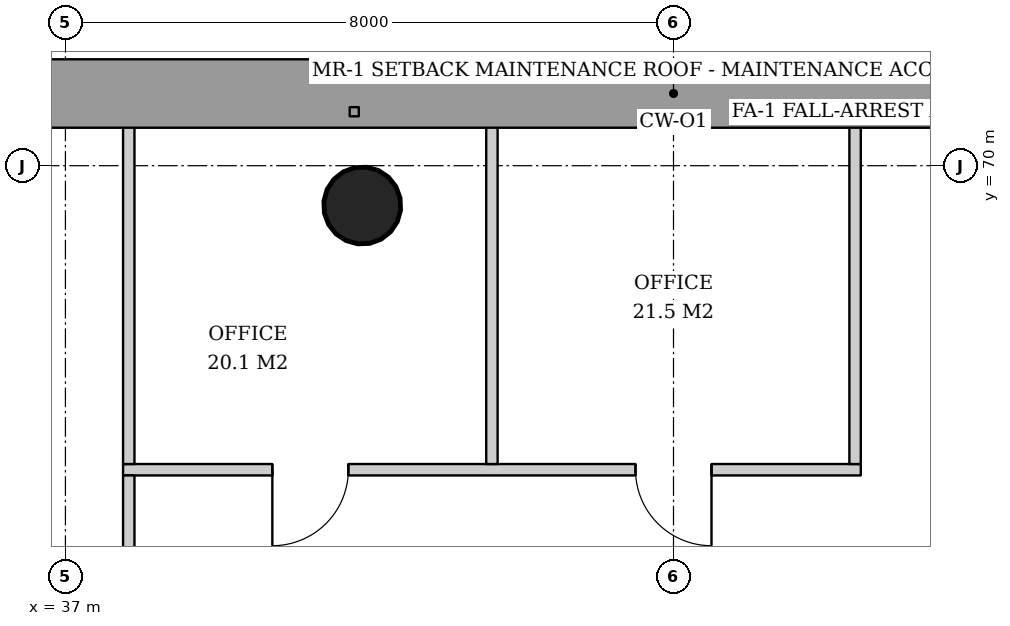
"""IFC4 building model, lengths in metres.
Left out: names, types, materials, properties, quantities, classifications, styles, units other than length and angle.
Written with IfcOpenShell. Run it as: python <this file> out.ifc"""

import sys

from ifc_helpers import new_model, si_unit, direction, frame, frame_2d, origin, origin_2d, place, context, subcontext, project, spatial, rectangle, hollow_circle, extrude, element, fill, save


model = new_model("IFC4")
c1 = context("Model", 3, precision=1e-05, world=origin(), true_north=direction((0.0, 1.0)))
c2 = subcontext(c1, "Body", "Model", "MODEL_VIEW")
j1 = project(units=[si_unit("LENGTHUNIT", "METRE"), si_unit("PLANEANGLEUNIT", "RADIAN")], contexts=[c1])
p1 = place(None, origin())
s1 = spatial("IfcSite", under=j1, at=p1, CompositionType="ELEMENT")
p2 = place(p1, origin())
s2 = spatial("IfcBuilding", under=s1, at=p2, CompositionType="ELEMENT")
p3 = place(p2, frame((0.0, 0.0, 36.2)))
s3 = spatial("IfcBuildingStorey", under=s2, at=p3, CompositionType="ELEMENT", Elevation=36.2)
p4 = place(p3, frame((40.897, 69.514, 0.0), z_axis=(0.00635704258, -0.031977850555, 0.999468361222), x_axis=(0.980807266515, 0.194979757801, 0.0)))
e1 = element("IfcColumn", 1, at=p4, inside=s3, PredefinedType="COLUMN", context=c2, shape_type="SweptSolid", body=[
    extrude(hollow_circle(Radius=0.508, WallThickness=0.04, at=origin_2d()), origin(), (0.0, 0.0, 1.0), 3.802),
])
p5 = place(p3, frame((47.464, 66.0, 0.0), z_axis=(0.0, 0.0, 1.0), x_axis=(-1.0, 0.0, 0.0)))
e2 = element("IfcWall", 2, at=p5, inside=s3, PredefinedType="PARTITIONING", context=c2, shape_type="SweptSolid", body=[
    extrude(rectangle(XDim=9.706, YDim=0.15, at=frame_2d((4.853, 0.0))), origin(), (0.0, 0.0, 1.0), 2.85),
])
p6 = place(p5, frame((1.964, 0.0, 0.0)))
e3 = element("IfcOpeningElement", 3, at=p6, cuts=e2, PredefinedType="OPENING", context=c2, shape_type="SweptSolid", body=[
    extrude(rectangle(XDim=1.0, YDim=2.1, at=frame_2d((0.5, 1.05))), frame((0.0, 0.085, 0.0), z_axis=(0.0, -1.0, 0.0), x_axis=(1.0, 0.0, 0.0)), (0.0, 0.0, 1.0), 0.17),
])
p7 = place(p5, frame((6.742, 0.0, 0.0)))
e4 = element("IfcOpeningElement", 4, at=p7, cuts=e2, PredefinedType="OPENING", context=c2, shape_type="SweptSolid", body=[
    extrude(rectangle(XDim=1.0, YDim=2.1, at=frame_2d((0.5, 1.05))), frame((0.0, 0.085, 0.0), z_axis=(0.0, -1.0, 0.0), x_axis=(1.0, 0.0, 0.0)), (0.0, 0.0, 1.0), 0.17),
])
for number, where, z_axis, x_axis in (
    (5, (47.389, 66.075, 0.0), (0.0, 0.0, 1.0), (0.0, 1.0, 0.0)),
    (6, (42.611, 66.075, 0.0), (0.0, 0.0, 1.0), (0.0, 1.0, 0.0)),
):
    element("IfcWall", number, at=place(p3, frame(where, z_axis=z_axis, x_axis=x_axis)), inside=s3, PredefinedType="PARTITIONING", context=c2, shape_type="SweptSolid", body=[
        extrude(rectangle(XDim=4.465, YDim=0.15, at=frame_2d((2.232, 0.0))), origin(), (0.0, 0.0, 1.0), 3.02),
    ])
p8 = place(p3, frame((37.833, 66.075, 0.0), z_axis=(0.0, 0.0, 1.0), x_axis=(0.0, 1.0, 0.0)))
e7 = element("IfcWall", 7, at=p8, inside=s3, PredefinedType="PARTITIONING", context=c2, shape_type="SweptSolid", body=[
    extrude(rectangle(XDim=4.465, YDim=0.15, at=frame_2d((2.232, 0.0))), origin(), (0.0, 0.0, 1.0), 2.85),
])
p9 = place(p3, frame((37.833, 62.05, 0.0), z_axis=(0.0, 0.0, 1.0), x_axis=(0.0, 1.0, 0.0)))
e8 = element("IfcWall", 8, at=p9, inside=s3, PredefinedType="PARTITIONING", context=c2, shape_type="SweptSolid", body=[
    extrude(rectangle(XDim=3.875, YDim=0.15, at=frame_2d((1.938, 0.0))), origin(), (0.0, 0.0, 1.0), 2.85),
])
p10 = place(p6, origin())
e9 = element("IfcDoor", 9, at=p10, inside=s3, OperationType="SINGLE_SWING_LEFT", PredefinedType="DOOR", context=c2, shape_type="SweptSolid", body=[
    extrude(rectangle(XDim=1.0, YDim=2.1, at=frame_2d((0.5, 1.05))), frame((0.0, 0.025, 0.0), z_axis=(0.0, -1.0, 0.0), x_axis=(1.0, 0.0, 0.0)), (0.0, 0.0, 1.0), 0.05),
])
fill(e3, e9)
p11 = place(p7, origin())
e10 = element("IfcDoor", 10, at=p11, inside=s3, OperationType="SINGLE_SWING_RIGHT", PredefinedType="DOOR", context=c2, shape_type="SweptSolid", body=[
    extrude(rectangle(XDim=1.0, YDim=2.1, at=frame_2d((0.5, 1.05))), frame((0.0, 0.025, 0.0), z_axis=(0.0, -1.0, 0.0), x_axis=(1.0, 0.0, 0.0)), (0.0, 0.0, 1.0), 0.05),
])
fill(e4, e10)
save(model, sys.argv[1])
